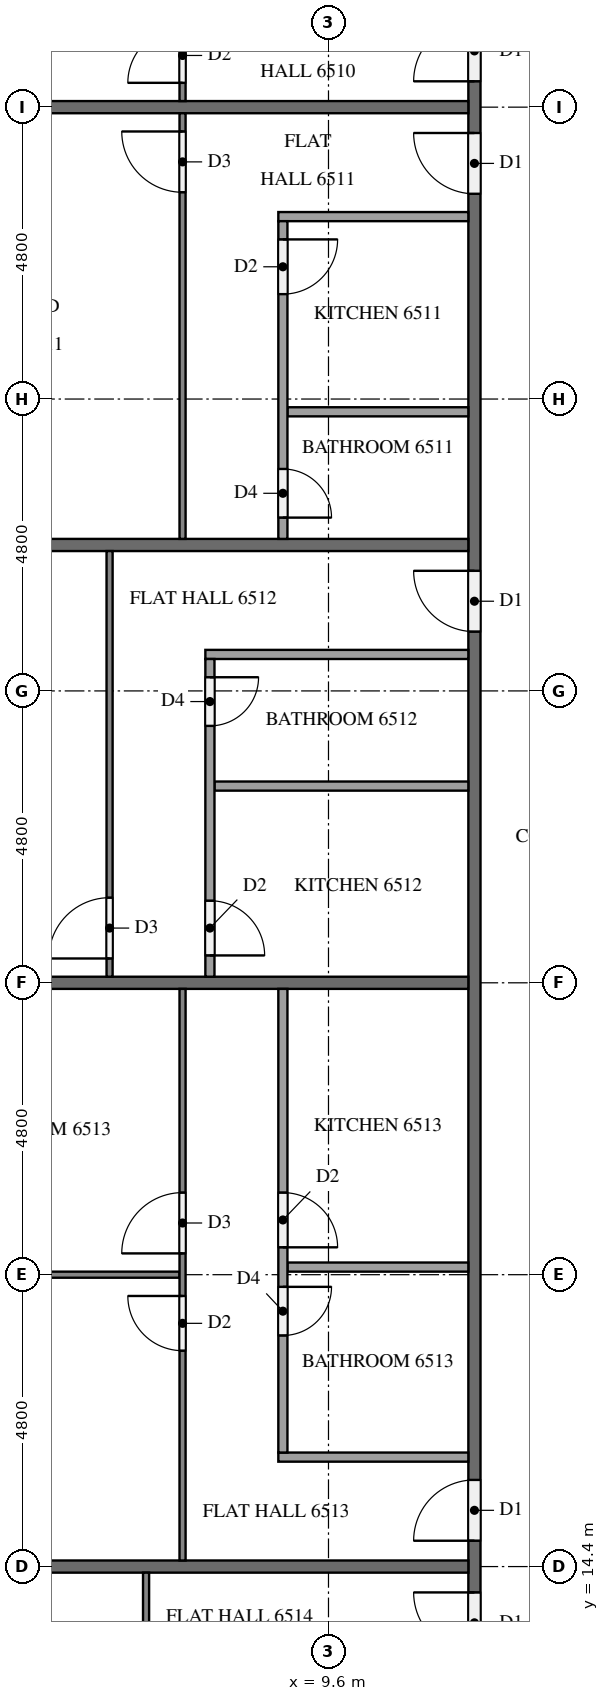
"""IFC4 building model, lengths in metres.
Left out: names, types, materials, properties, quantities, classifications, styles, units other than length and angle.
Written with IfcOpenShell. Run it as: python <this file> out.ifc"""

import sys

from ifc_helpers import new_model, si_unit, direction, frame, frame_2d, origin, place, context, subcontext, project, spatial, rectangle, extrude, element, fill, save


model = new_model("IFC4")
c1 = context("Model", 3, precision=1e-05, world=origin(), true_north=direction((0.0, 1.0)))
c2 = subcontext(c1, "Body", "Model", "MODEL_VIEW")
j1 = project(units=[si_unit("LENGTHUNIT", "METRE"), si_unit("PLANEANGLEUNIT", "RADIAN")], contexts=[c1])
p1 = place(None, origin())
s1 = spatial("IfcSite", under=j1, at=p1, CompositionType="ELEMENT")
p2 = place(p1, origin())
s2 = spatial("IfcBuilding", under=s1, at=p2, CompositionType="ELEMENT")
p3 = place(p2, frame((0.0, 0.0, 249.2)))
s3 = spatial("IfcBuildingStorey", under=s2, at=p3, CompositionType="ELEMENT", Elevation=249.2)
p4 = place(p3, frame((12.0, 12.1, 0.0), z_axis=(0.0, 0.0, 1.0), x_axis=(0.0, 1.0, 0.0)))
e1 = element("IfcWall", 1, at=p4, inside=s3, PredefinedType="PARTITIONING", context=c2, shape_type="SweptSolid", body=[
    extrude(rectangle(XDim=28.6, YDim=0.2, at=frame_2d((14.3, 0.0))), origin(), (0.0, 0.0, 1.0), 3.2),
])
p5 = place(p4, frame((26.725, 0.0, 0.0)))
e2 = element("IfcOpeningElement", 2, at=p5, cuts=e1, PredefinedType="OPENING", context=c2, shape_type="SweptSolid", body=[
    extrude(rectangle(XDim=1.0, YDim=2.1, at=frame_2d((0.5, 1.05))), frame((0.0, 0.11, 0.0), z_axis=(0.0, -1.0, 0.0), x_axis=(1.0, 0.0, 0.0)), (0.0, 0.0, 1.0), 0.22),
])
p6 = place(p4, frame((24.875, 0.0, 0.0)))
e3 = element("IfcOpeningElement", 3, at=p6, cuts=e1, PredefinedType="OPENING", context=c2, shape_type="SweptSolid", body=[
    extrude(rectangle(XDim=1.0, YDim=2.1, at=frame_2d((0.5, 1.05))), frame((0.0, 0.11, 0.0), z_axis=(0.0, -1.0, 0.0), x_axis=(1.0, 0.0, 0.0)), (0.0, 0.0, 1.0), 0.22),
])
p7 = place(p4, frame((17.675, 0.0, 0.0)))
e4 = element("IfcOpeningElement", 4, at=p7, cuts=e1, PredefinedType="OPENING", context=c2, shape_type="SweptSolid", body=[
    extrude(rectangle(XDim=1.0, YDim=2.1, at=frame_2d((0.5, 1.05))), frame((0.0, 0.11, 0.0), z_axis=(0.0, -1.0, 0.0), x_axis=(1.0, 0.0, 0.0)), (0.0, 0.0, 1.0), 0.22),
])
p8 = place(p4, frame((2.725, 0.0, 0.0)))
e5 = element("IfcOpeningElement", 5, at=p8, cuts=e1, PredefinedType="OPENING", context=c2, shape_type="SweptSolid", body=[
    extrude(rectangle(XDim=1.0, YDim=2.1, at=frame_2d((0.5, 1.05))), frame((0.0, 0.11, 0.0), z_axis=(0.0, -1.0, 0.0), x_axis=(1.0, 0.0, 0.0)), (0.0, 0.0, 1.0), 0.22),
])
p9 = place(p4, frame((0.875, 0.0, 0.0)))
e6 = element("IfcOpeningElement", 6, at=p9, cuts=e1, PredefinedType="OPENING", context=c2, shape_type="SweptSolid", body=[
    extrude(rectangle(XDim=1.0, YDim=2.1, at=frame_2d((0.5, 1.05))), frame((0.0, 0.11, 0.0), z_axis=(0.0, -1.0, 0.0), x_axis=(1.0, 0.0, 0.0)), (0.0, 0.0, 1.0), 0.22),
])
p10 = place(p3, frame((0.275, 38.4, 0.0), z_axis=(0.0, 0.0, 1.0), x_axis=(1.0, 0.0, 0.0)))
e7 = element("IfcWall", 7, at=p10, inside=s3, PredefinedType="PARTITIONING", context=c2, shape_type="SweptSolid", body=[
    extrude(rectangle(XDim=11.625, YDim=0.2, at=frame_2d((5.812, 0.0))), origin(), (0.0, 0.0, 1.0), 3.2),
])
for number, where, z_axis, x_axis in (
    (8, (0.1, 31.2, 0.0), (0.0, 0.0, 1.0), (1.0, 0.0, 0.0)),
    (9, (0.1, 24.0, 0.0), (0.0, 0.0, 1.0), (1.0, 0.0, 0.0)),
    (10, (0.1, 14.4, 0.0), (0.0, 0.0, 1.0), (1.0, 0.0, 0.0)),
):
    element("IfcWall", number, at=place(p3, frame(where, z_axis=z_axis, x_axis=x_axis)), inside=s3, PredefinedType="PARTITIONING", context=c2, shape_type="SweptSolid", body=[
        extrude(rectangle(XDim=11.8, YDim=0.2, at=frame_2d((5.9, 0.0))), origin(), (0.0, 0.0, 1.0), 3.2),
    ])
p11 = place(p3, frame((7.2, 38.5, 0.0), z_axis=(0.0, 0.0, 1.0), x_axis=(0.0, 1.0, 0.0)))
e11 = element("IfcWall", 11, at=p11, inside=s3, PredefinedType="PARTITIONING", context=c2, shape_type="SweptSolid", body=[
    extrude(rectangle(XDim=14.2, YDim=0.1, at=frame_2d((7.1, 0.0))), origin(), (0.0, 0.0, 1.0), 3.2),
])
p12 = place(p11, frame((0.3, 0.0, 0.0)))
e12 = element("IfcOpeningElement", 12, at=p12, cuts=e11, PredefinedType="OPENING", context=c2, shape_type="SweptSolid", body=[
    extrude(rectangle(XDim=0.9, YDim=2.1, at=frame_2d((0.45, 1.05))), frame((0.0, 0.06, 0.0), z_axis=(0.0, -1.0, 0.0), x_axis=(1.0, 0.0, 0.0)), (0.0, 0.0, 1.0), 0.12),
])
p13 = place(p11, frame((8.25, 0.0, 0.0)))
e13 = element("IfcOpeningElement", 13, at=p13, cuts=e11, PredefinedType="OPENING", context=c2, shape_type="SweptSolid", body=[
    extrude(rectangle(XDim=0.9, YDim=2.1, at=frame_2d((0.45, 1.05))), frame((0.0, 0.06, 0.0), z_axis=(0.0, -1.0, 0.0), x_axis=(1.0, 0.0, 0.0)), (0.0, 0.0, 1.0), 0.12),
])
p14 = place(p11, frame((9.85, 0.0, 0.0)))
e14 = element("IfcOpeningElement", 14, at=p14, cuts=e11, PredefinedType="OPENING", context=c2, shape_type="SweptSolid", body=[
    extrude(rectangle(XDim=1.0, YDim=2.1, at=frame_2d((0.5, 1.05))), frame((0.0, 0.06, 0.0), z_axis=(0.0, -1.0, 0.0), x_axis=(1.0, 0.0, 0.0)), (0.0, 0.0, 1.0), 0.12),
])
p15 = place(p3, frame((7.2, 31.3, 0.0), z_axis=(0.0, 0.0, 1.0), x_axis=(0.0, 1.0, 0.0)))
e15 = element("IfcWall", 15, at=p15, inside=s3, PredefinedType="PARTITIONING", context=c2, shape_type="SweptSolid", body=[
    extrude(rectangle(XDim=7.0, YDim=0.1, at=frame_2d((3.5, 0.0))), origin(), (0.0, 0.0, 1.0), 3.2),
])
p16 = place(p15, frame((5.7, 0.0, 0.0)))
e16 = element("IfcOpeningElement", 16, at=p16, cuts=e15, PredefinedType="OPENING", context=c2, shape_type="SweptSolid", body=[
    extrude(rectangle(XDim=1.0, YDim=2.1, at=frame_2d((0.5, 1.05))), frame((0.0, 0.06, 0.0), z_axis=(0.0, -1.0, 0.0), x_axis=(1.0, 0.0, 0.0)), (0.0, 0.0, 1.0), 0.12),
])
p17 = place(p3, frame((11.9, 33.39, 0.0), z_axis=(0.0, 0.0, 1.0), x_axis=(-1.0, 0.0, 0.0)))
e17 = element("IfcWall", 17, at=p17, inside=s3, PredefinedType="PARTITIONING", context=c2, shape_type="SweptSolid", body=[
    extrude(rectangle(XDim=2.975, YDim=0.15, at=frame_2d((1.487, 0.0))), origin(), (0.0, 0.0, 1.0), 3.2),
])
p18 = place(p3, frame((11.9, 36.6, 0.0), z_axis=(0.0, 0.0, 1.0), x_axis=(-1.0, 0.0, 0.0)))
e18 = element("IfcWall", 18, at=p18, inside=s3, PredefinedType="PARTITIONING", context=c2, shape_type="SweptSolid", body=[
    extrude(rectangle(XDim=3.125, YDim=0.15, at=frame_2d((1.562, 0.0))), origin(), (0.0, 0.0, 1.0), 3.2),
])
p19 = place(p3, frame((8.85, 36.525, 0.0), z_axis=(0.0, 0.0, 1.0), x_axis=(0.0, -1.0, 0.0)))
e19 = element("IfcWall", 19, at=p19, inside=s3, PredefinedType="PARTITIONING", context=c2, shape_type="SweptSolid", body=[
    extrude(rectangle(XDim=5.225, YDim=0.15, at=frame_2d((2.612, 0.0))), origin(), (0.0, 0.0, 1.0), 3.2),
])
p20 = place(p19, frame((0.3, 0.0, 0.0)))
e20 = element("IfcOpeningElement", 20, at=p20, cuts=e19, PredefinedType="OPENING", context=c2, shape_type="SweptSolid", body=[
    extrude(rectangle(XDim=0.9, YDim=2.1, at=frame_2d((0.45, 1.05))), frame((0.0, 0.085, 0.0), z_axis=(0.0, -1.0, 0.0), x_axis=(1.0, 0.0, 0.0)), (0.0, 0.0, 1.0), 0.17),
])
p21 = place(p19, frame((4.075, 0.0, 0.0)))
e21 = element("IfcOpeningElement", 21, at=p21, cuts=e19, PredefinedType="OPENING", context=c2, shape_type="SweptSolid", body=[
    extrude(rectangle(XDim=0.8, YDim=2.1, at=frame_2d((0.4, 1.05))), frame((0.0, 0.085, 0.0), z_axis=(0.0, -1.0, 0.0), x_axis=(1.0, 0.0, 0.0)), (0.0, 0.0, 1.0), 0.17),
])
p22 = place(p3, frame((6.0, 24.1, 0.0), z_axis=(0.0, 0.0, 1.0), x_axis=(0.0, 1.0, 0.0)))
e22 = element("IfcWall", 22, at=p22, inside=s3, PredefinedType="PARTITIONING", context=c2, shape_type="SweptSolid", body=[
    extrude(rectangle(XDim=7.0, YDim=0.1, at=frame_2d((3.5, 0.0))), origin(), (0.0, 0.0, 1.0), 3.2),
])
p23 = place(p22, frame((0.3, 0.0, 0.0)))
e23 = element("IfcOpeningElement", 23, at=p23, cuts=e22, PredefinedType="OPENING", context=c2, shape_type="SweptSolid", body=[
    extrude(rectangle(XDim=1.0, YDim=2.1, at=frame_2d((0.5, 1.05))), frame((0.0, 0.06, 0.0), z_axis=(0.0, -1.0, 0.0), x_axis=(1.0, 0.0, 0.0)), (0.0, 0.0, 1.0), 0.12),
])
p24 = place(p3, frame((11.9, 27.235, 0.0), z_axis=(0.0, 0.0, 1.0), x_axis=(-1.0, 0.0, 0.0)))
e24 = element("IfcWall", 24, at=p24, inside=s3, PredefinedType="PARTITIONING", context=c2, shape_type="SweptSolid", body=[
    extrude(rectangle(XDim=4.175, YDim=0.15, at=frame_2d((2.087, 0.0))), origin(), (0.0, 0.0, 1.0), 3.2),
])
p25 = place(p3, frame((11.9, 29.4, 0.0), z_axis=(0.0, 0.0, 1.0), x_axis=(-1.0, 0.0, 0.0)))
e25 = element("IfcWall", 25, at=p25, inside=s3, PredefinedType="PARTITIONING", context=c2, shape_type="SweptSolid", body=[
    extrude(rectangle(XDim=4.325, YDim=0.15, at=frame_2d((2.163, 0.0))), origin(), (0.0, 0.0, 1.0), 3.2),
])
p26 = place(p3, frame((7.65, 29.325, 0.0), z_axis=(0.0, 0.0, 1.0), x_axis=(0.0, -1.0, 0.0)))
e26 = element("IfcWall", 26, at=p26, inside=s3, PredefinedType="PARTITIONING", context=c2, shape_type="SweptSolid", body=[
    extrude(rectangle(XDim=5.225, YDim=0.15, at=frame_2d((2.612, 0.0))), origin(), (0.0, 0.0, 1.0), 3.2),
])
p27 = place(p26, frame((0.3, 0.0, 0.0)))
e27 = element("IfcOpeningElement", 27, at=p27, cuts=e26, PredefinedType="OPENING", context=c2, shape_type="SweptSolid", body=[
    extrude(rectangle(XDim=0.8, YDim=2.1, at=frame_2d((0.4, 1.05))), frame((0.0, 0.085, 0.0), z_axis=(0.0, -1.0, 0.0), x_axis=(1.0, 0.0, 0.0)), (0.0, 0.0, 1.0), 0.17),
])
p28 = place(p26, frame((3.975, 0.0, 0.0)))
e28 = element("IfcOpeningElement", 28, at=p28, cuts=e26, PredefinedType="OPENING", context=c2, shape_type="SweptSolid", body=[
    extrude(rectangle(XDim=0.9, YDim=2.1, at=frame_2d((0.45, 1.05))), frame((0.0, 0.085, 0.0), z_axis=(0.0, -1.0, 0.0), x_axis=(1.0, 0.0, 0.0)), (0.0, 0.0, 1.0), 0.17),
])
p29 = place(p3, frame((7.15, 19.2, 0.0), z_axis=(0.0, 0.0, 1.0), x_axis=(-1.0, 0.0, 0.0)))
e29 = element("IfcWall", 29, at=p29, inside=s3, PredefinedType="PARTITIONING", context=c2, shape_type="SweptSolid", body=[
    extrude(rectangle(XDim=6.875, YDim=0.1, at=frame_2d((3.438, 0.0))), origin(), (0.0, 0.0, 1.0), 3.2),
])
p30 = place(p3, frame((7.2, 14.5, 0.0), z_axis=(0.0, 0.0, 1.0), x_axis=(0.0, 1.0, 0.0)))
e30 = element("IfcWall", 30, at=p30, inside=s3, PredefinedType="PARTITIONING", context=c2, shape_type="SweptSolid", body=[
    extrude(rectangle(XDim=9.4, YDim=0.1, at=frame_2d((4.7, 0.0))), origin(), (0.0, 0.0, 1.0), 3.2),
])
p31 = place(p30, frame((3.45, 0.0, 0.0)))
e31 = element("IfcOpeningElement", 31, at=p31, cuts=e30, PredefinedType="OPENING", context=c2, shape_type="SweptSolid", body=[
    extrude(rectangle(XDim=0.9, YDim=2.1, at=frame_2d((0.45, 1.05))), frame((0.0, 0.06, 0.0), z_axis=(0.0, -1.0, 0.0), x_axis=(1.0, 0.0, 0.0)), (0.0, 0.0, 1.0), 0.12),
])
p32 = place(p30, frame((5.05, 0.0, 0.0)))
e32 = element("IfcOpeningElement", 32, at=p32, cuts=e30, PredefinedType="OPENING", context=c2, shape_type="SweptSolid", body=[
    extrude(rectangle(XDim=1.0, YDim=2.1, at=frame_2d((0.5, 1.05))), frame((0.0, 0.06, 0.0), z_axis=(0.0, -1.0, 0.0), x_axis=(1.0, 0.0, 0.0)), (0.0, 0.0, 1.0), 0.12),
])
p33 = place(p3, frame((11.9, 19.325, 0.0), z_axis=(0.0, 0.0, 1.0), x_axis=(-1.0, 0.0, 0.0)))
e33 = element("IfcWall", 33, at=p33, inside=s3, PredefinedType="PARTITIONING", context=c2, shape_type="SweptSolid", body=[
    extrude(rectangle(XDim=2.975, YDim=0.15, at=frame_2d((1.487, 0.0))), origin(), (0.0, 0.0, 1.0), 3.2),
])
p34 = place(p3, frame((11.9, 16.2, 0.0), z_axis=(0.0, 0.0, 1.0), x_axis=(-1.0, 0.0, 0.0)))
e34 = element("IfcWall", 34, at=p34, inside=s3, PredefinedType="PARTITIONING", context=c2, shape_type="SweptSolid", body=[
    extrude(rectangle(XDim=3.125, YDim=0.15, at=frame_2d((1.562, 0.0))), origin(), (0.0, 0.0, 1.0), 3.2),
])
p35 = place(p3, frame((8.85, 23.9, 0.0), z_axis=(0.0, 0.0, 1.0), x_axis=(0.0, -1.0, 0.0)))
e35 = element("IfcWall", 35, at=p35, inside=s3, PredefinedType="PARTITIONING", context=c2, shape_type="SweptSolid", body=[
    extrude(rectangle(XDim=7.625, YDim=0.15, at=frame_2d((3.812, 0.0))), origin(), (0.0, 0.0, 1.0), 3.2),
])
p36 = place(p35, frame((4.9, 0.0, 0.0)))
e36 = element("IfcOpeningElement", 36, at=p36, cuts=e35, PredefinedType="OPENING", context=c2, shape_type="SweptSolid", body=[
    extrude(rectangle(XDim=0.8, YDim=2.1, at=frame_2d((0.4, 1.05))), frame((0.0, 0.085, 0.0), z_axis=(0.0, -1.0, 0.0), x_axis=(1.0, 0.0, 0.0)), (0.0, 0.0, 1.0), 0.17),
])
p37 = place(p35, frame((3.35, 0.0, 0.0)))
e37 = element("IfcOpeningElement", 37, at=p37, cuts=e35, PredefinedType="OPENING", context=c2, shape_type="SweptSolid", body=[
    extrude(rectangle(XDim=0.9, YDim=2.1, at=frame_2d((0.45, 1.05))), frame((0.0, 0.085, 0.0), z_axis=(0.0, -1.0, 0.0), x_axis=(1.0, 0.0, 0.0)), (0.0, 0.0, 1.0), 0.17),
])
p38 = place(p3, frame((6.6, 4.9, 0.0), z_axis=(0.0, 0.0, 1.0), x_axis=(0.0, 1.0, 0.0)))
e38 = element("IfcWall", 38, at=p38, inside=s3, PredefinedType="PARTITIONING", context=c2, shape_type="SweptSolid", body=[
    extrude(rectangle(XDim=9.4, YDim=0.1, at=frame_2d((4.7, 0.0))), origin(), (0.0, 0.0, 1.0), 3.2),
])
p39 = place(p38, frame((5.05, 0.0, 0.0)))
e39 = element("IfcOpeningElement", 39, at=p39, cuts=e38, PredefinedType="OPENING", context=c2, shape_type="SweptSolid", body=[
    extrude(rectangle(XDim=0.9, YDim=2.1, at=frame_2d((0.45, 1.05))), frame((0.0, 0.06, 0.0), z_axis=(0.0, -1.0, 0.0), x_axis=(1.0, 0.0, 0.0)), (0.0, 0.0, 1.0), 0.12),
])
p40 = place(p38, frame((3.35, 0.0, 0.0)))
e40 = element("IfcOpeningElement", 40, at=p40, cuts=e38, PredefinedType="OPENING", context=c2, shape_type="SweptSolid", body=[
    extrude(rectangle(XDim=1.0, YDim=2.1, at=frame_2d((0.5, 1.05))), frame((0.0, 0.06, 0.0), z_axis=(0.0, -1.0, 0.0), x_axis=(1.0, 0.0, 0.0)), (0.0, 0.0, 1.0), 0.12),
])
p41 = place(p5, origin())
e41 = element("IfcDoor", 41, at=p41, inside=s3, OperationType="SINGLE_SWING_LEFT", PredefinedType="DOOR", context=c2, shape_type="SweptSolid", body=[
    extrude(rectangle(XDim=1.0, YDim=2.1, at=frame_2d((0.5, 1.05))), frame((0.0, 0.025, 0.0), z_axis=(0.0, -1.0, 0.0), x_axis=(1.0, 0.0, 0.0)), (0.0, 0.0, 1.0), 0.05),
])
fill(e2, e41)
p42 = place(p6, origin())
e42 = element("IfcDoor", 42, at=p42, inside=s3, OperationType="SINGLE_SWING_RIGHT", PredefinedType="DOOR", context=c2, shape_type="SweptSolid", body=[
    extrude(rectangle(XDim=1.0, YDim=2.1, at=frame_2d((0.5, 1.05))), frame((0.0, 0.025, 0.0), z_axis=(0.0, -1.0, 0.0), x_axis=(1.0, 0.0, 0.0)), (0.0, 0.0, 1.0), 0.05),
])
fill(e3, e42)
p43 = place(p7, origin())
e43 = element("IfcDoor", 43, at=p43, inside=s3, OperationType="SINGLE_SWING_RIGHT", PredefinedType="DOOR", context=c2, shape_type="SweptSolid", body=[
    extrude(rectangle(XDim=1.0, YDim=2.1, at=frame_2d((0.5, 1.05))), frame((0.0, 0.025, 0.0), z_axis=(0.0, -1.0, 0.0), x_axis=(1.0, 0.0, 0.0)), (0.0, 0.0, 1.0), 0.05),
])
fill(e4, e43)
p44 = place(p8, origin())
e44 = element("IfcDoor", 44, at=p44, inside=s3, OperationType="SINGLE_SWING_LEFT", PredefinedType="DOOR", context=c2, shape_type="SweptSolid", body=[
    extrude(rectangle(XDim=1.0, YDim=2.1, at=frame_2d((0.5, 1.05))), frame((0.0, 0.025, 0.0), z_axis=(0.0, -1.0, 0.0), x_axis=(1.0, 0.0, 0.0)), (0.0, 0.0, 1.0), 0.05),
])
fill(e5, e44)
p45 = place(p9, origin())
e45 = element("IfcDoor", 45, at=p45, inside=s3, OperationType="SINGLE_SWING_RIGHT", PredefinedType="DOOR", context=c2, shape_type="SweptSolid", body=[
    extrude(rectangle(XDim=1.0, YDim=2.1, at=frame_2d((0.5, 1.05))), frame((0.0, 0.025, 0.0), z_axis=(0.0, -1.0, 0.0), x_axis=(1.0, 0.0, 0.0)), (0.0, 0.0, 1.0), 0.05),
])
fill(e6, e45)
p46 = place(p12, origin())
e46 = element("IfcDoor", 46, at=p46, inside=s3, OperationType="SINGLE_SWING_LEFT", PredefinedType="DOOR", context=c2, shape_type="SweptSolid", body=[
    extrude(rectangle(XDim=0.9, YDim=2.1, at=frame_2d((0.45, 1.05))), frame((0.0, 0.025, 0.0), z_axis=(0.0, -1.0, 0.0), x_axis=(1.0, 0.0, 0.0)), (0.0, 0.0, 1.0), 0.05),
])
fill(e12, e46)
p47 = place(p16, origin())
e47 = element("IfcDoor", 47, at=p47, inside=s3, OperationType="SINGLE_SWING_RIGHT", PredefinedType="DOOR", context=c2, shape_type="SweptSolid", body=[
    extrude(rectangle(XDim=1.0, YDim=2.1, at=frame_2d((0.5, 1.05))), frame((0.0, 0.025, 0.0), z_axis=(0.0, -1.0, 0.0), x_axis=(1.0, 0.0, 0.0)), (0.0, 0.0, 1.0), 0.05),
])
fill(e16, e47)
p48 = place(p20, origin())
e48 = element("IfcDoor", 48, at=p48, inside=s3, OperationType="SINGLE_SWING_LEFT", PredefinedType="DOOR", context=c2, shape_type="SweptSolid", body=[
    extrude(rectangle(XDim=0.9, YDim=2.1, at=frame_2d((0.45, 1.05))), frame((0.0, 0.025, 0.0), z_axis=(0.0, -1.0, 0.0), x_axis=(1.0, 0.0, 0.0)), (0.0, 0.0, 1.0), 0.05),
])
fill(e20, e48)
p49 = place(p21, origin())
e49 = element("IfcDoor", 49, at=p49, inside=s3, OperationType="SINGLE_SWING_RIGHT", PredefinedType="DOOR", context=c2, shape_type="SweptSolid", body=[
    extrude(rectangle(XDim=0.8, YDim=2.1, at=frame_2d((0.4, 1.05))), frame((0.0, 0.025, 0.0), z_axis=(0.0, -1.0, 0.0), x_axis=(1.0, 0.0, 0.0)), (0.0, 0.0, 1.0), 0.05),
])
fill(e21, e49)
p50 = place(p23, origin())
e50 = element("IfcDoor", 50, at=p50, inside=s3, OperationType="SINGLE_SWING_LEFT", PredefinedType="DOOR", context=c2, shape_type="SweptSolid", body=[
    extrude(rectangle(XDim=1.0, YDim=2.1, at=frame_2d((0.5, 1.05))), frame((0.0, 0.025, 0.0), z_axis=(0.0, -1.0, 0.0), x_axis=(1.0, 0.0, 0.0)), (0.0, 0.0, 1.0), 0.05),
])
fill(e23, e50)
p51 = place(p27, origin())
e51 = element("IfcDoor", 51, at=p51, inside=s3, OperationType="SINGLE_SWING_LEFT", PredefinedType="DOOR", context=c2, shape_type="SweptSolid", body=[
    extrude(rectangle(XDim=0.8, YDim=2.1, at=frame_2d((0.4, 1.05))), frame((0.0, 0.025, 0.0), z_axis=(0.0, -1.0, 0.0), x_axis=(1.0, 0.0, 0.0)), (0.0, 0.0, 1.0), 0.05),
])
fill(e27, e51)
p52 = place(p28, origin())
e52 = element("IfcDoor", 52, at=p52, inside=s3, OperationType="SINGLE_SWING_RIGHT", PredefinedType="DOOR", context=c2, shape_type="SweptSolid", body=[
    extrude(rectangle(XDim=0.9, YDim=2.1, at=frame_2d((0.45, 1.05))), frame((0.0, 0.025, 0.0), z_axis=(0.0, -1.0, 0.0), x_axis=(1.0, 0.0, 0.0)), (0.0, 0.0, 1.0), 0.05),
])
fill(e28, e52)
p53 = place(p31, origin())
e53 = element("IfcDoor", 53, at=p53, inside=s3, OperationType="SINGLE_SWING_RIGHT", PredefinedType="DOOR", context=c2, shape_type="SweptSolid", body=[
    extrude(rectangle(XDim=0.9, YDim=2.1, at=frame_2d((0.45, 1.05))), frame((0.0, 0.025, 0.0), z_axis=(0.0, -1.0, 0.0), x_axis=(1.0, 0.0, 0.0)), (0.0, 0.0, 1.0), 0.05),
])
fill(e31, e53)
p54 = place(p32, origin())
e54 = element("IfcDoor", 54, at=p54, inside=s3, OperationType="SINGLE_SWING_LEFT", PredefinedType="DOOR", context=c2, shape_type="SweptSolid", body=[
    extrude(rectangle(XDim=1.0, YDim=2.1, at=frame_2d((0.5, 1.05))), frame((0.0, 0.025, 0.0), z_axis=(0.0, -1.0, 0.0), x_axis=(1.0, 0.0, 0.0)), (0.0, 0.0, 1.0), 0.05),
])
fill(e32, e54)
p55 = place(p36, origin())
e55 = element("IfcDoor", 55, at=p55, inside=s3, OperationType="SINGLE_SWING_LEFT", PredefinedType="DOOR", context=c2, shape_type="SweptSolid", body=[
    extrude(rectangle(XDim=0.8, YDim=2.1, at=frame_2d((0.4, 1.05))), frame((0.0, 0.025, 0.0), z_axis=(0.0, -1.0, 0.0), x_axis=(1.0, 0.0, 0.0)), (0.0, 0.0, 1.0), 0.05),
])
fill(e36, e55)
p56 = place(p37, origin())
e56 = element("IfcDoor", 56, at=p56, inside=s3, OperationType="SINGLE_SWING_RIGHT", PredefinedType="DOOR", context=c2, shape_type="SweptSolid", body=[
    extrude(rectangle(XDim=0.9, YDim=2.1, at=frame_2d((0.45, 1.05))), frame((0.0, 0.025, 0.0), z_axis=(0.0, -1.0, 0.0), x_axis=(1.0, 0.0, 0.0)), (0.0, 0.0, 1.0), 0.05),
])
fill(e37, e56)
save(model, sys.argv[1])
